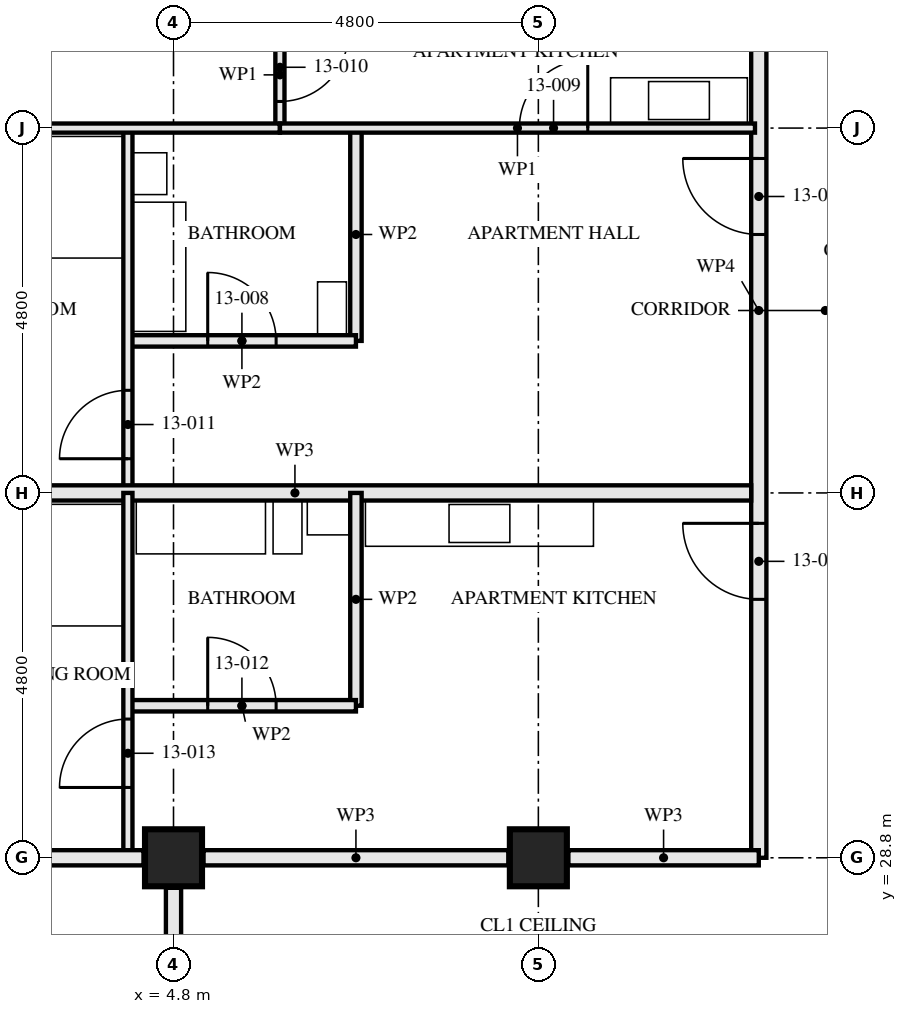
"""IFC4 building model, lengths in metres.
Left out: names, types, materials, properties, quantities, classifications, styles, units other than length and angle.
Written with IfcOpenShell. Run it as: python <this file> out.ifc"""

import sys

from ifc_helpers import new_model, si_unit, direction, frame, frame_2d, origin, origin_2d, place, context, subcontext, project, spatial, rectangle, hollow_rectangle, extrude, element, fill, save


model = new_model("IFC4")
c1 = context("Model", 3, precision=1e-05, world=origin(), true_north=direction((0.0, 1.0)))
c2 = subcontext(c1, "Body", "Model", "MODEL_VIEW")
j1 = project(units=[si_unit("LENGTHUNIT", "METRE"), si_unit("PLANEANGLEUNIT", "RADIAN")], contexts=[c1])
p1 = place(None, origin())
s1 = spatial("IfcSite", under=j1, at=p1, CompositionType="ELEMENT")
p2 = place(p1, origin())
s2 = spatial("IfcBuilding", under=s1, at=p2, CompositionType="ELEMENT")
p3 = place(p2, frame((0.0, 0.0, 51.5)))
s3 = spatial("IfcBuildingStorey", under=s2, at=p3, CompositionType="ELEMENT", Elevation=51.5)
for number, where, z_axis, x_axis in (
    (1, (4.8, 28.8, 0.0), (0.0, 0.0, 1.0), (0.0, 1.0, 0.0)),
    (2, (9.6, 28.8, 0.0), (0.0, 0.0, 1.0), (0.0, 1.0, 0.0)),
):
    element("IfcColumn", number, at=place(p3, frame(where, z_axis=z_axis, x_axis=x_axis)), inside=s3, PredefinedType="COLUMN", context=c2, shape_type="SweptSolid", body=[
        extrude(hollow_rectangle(XDim=0.75, YDim=0.75, WallThickness=0.08, at=origin_2d()), origin(), (0.0, 0.0, 1.0), 3.5),
    ])
p4 = place(p3, frame((4.8, 26.8, 0.0), z_axis=(0.0, 0.0, 1.0), x_axis=(0.0, 1.0, 0.0)))
e3 = element("IfcWall", 3, at=p4, inside=s3, PredefinedType="PARTITIONING", context=c2, shape_type="SweptSolid", body=[
    extrude(rectangle(XDim=1.605, YDim=0.2, at=frame_2d((0.802, 0.0))), origin(), (0.0, 0.0, 1.0), 3.33),
])
p5 = place(p3, frame((4.2, 35.6, 0.0), z_axis=(0.0, 0.0, 1.0), x_axis=(1.0, 0.0, 0.0)))
e4 = element("IfcWall", 4, at=p5, inside=s3, PredefinedType="PARTITIONING", context=c2, shape_type="SweptSolid", body=[
    extrude(rectangle(XDim=3.0, YDim=0.15, at=frame_2d((1.5, 0.0))), origin(), (0.0, 0.0, 1.0), 3.33),
])
p6 = place(p5, frame((1.05, 0.0, 0.0)))
e5 = element("IfcOpeningElement", 5, at=p6, cuts=e4, PredefinedType="OPENING", context=c2, shape_type="SweptSolid", body=[
    extrude(rectangle(XDim=0.9, YDim=2.1, at=frame_2d((0.45, 1.05))), frame((0.0, 0.085, 0.0), z_axis=(0.0, -1.0, 0.0), x_axis=(1.0, 0.0, 0.0)), (0.0, 0.0, 1.0), 0.171),
])
p7 = place(p3, frame((7.2, 38.4, 0.0), z_axis=(0.0, 0.0, 1.0), x_axis=(0.0, -1.0, 0.0)))
e6 = element("IfcWall", 6, at=p7, inside=s3, PredefinedType="PARTITIONING", context=c2, shape_type="SweptSolid", body=[
    extrude(rectangle(XDim=2.8, YDim=0.15, at=frame_2d((1.4, 0.0))), origin(), (0.0, 0.0, 1.0), 3.33),
])
p8 = place(p3, frame((6.2, 38.4, 0.0), z_axis=(0.0, 0.0, 1.0), x_axis=(1.0, 0.0, 0.0)))
e7 = element("IfcWall", 7, at=p8, inside=s3, PredefinedType="PARTITIONING", context=c2, shape_type="SweptSolid", body=[
    extrude(rectangle(XDim=6.25, YDim=0.12, at=frame_2d((3.125, 0.0))), origin(), (0.0, 0.0, 1.0), 2.55),
])
p9 = place(p8, frame((3.15, 0.0, 0.0)))
e8 = element("IfcOpeningElement", 8, at=p9, cuts=e7, PredefinedType="OPENING", context=c2, shape_type="SweptSolid", body=[
    extrude(rectangle(XDim=0.9, YDim=2.1, at=frame_2d((0.45, 1.05))), frame((0.0, 0.071, 0.0), z_axis=(0.0, -1.0, 0.0), x_axis=(1.0, 0.0, 0.0)), (0.0, 0.0, 1.0), 0.141),
])
p10 = place(p3, frame((6.2, 39.8, 0.0), z_axis=(0.0, 0.0, 1.0), x_axis=(0.0, -1.0, 0.0)))
e9 = element("IfcWall", 9, at=p10, inside=s3, PredefinedType="PARTITIONING", context=c2, shape_type="SweptSolid", body=[
    extrude(rectangle(XDim=1.4, YDim=0.12, at=frame_2d((0.7, 0.0))), origin(), (0.0, 0.0, 1.0), 3.33),
])
p11 = place(p10, frame((0.15, 0.0, 0.0)))
e10 = element("IfcOpeningElement", 10, at=p11, cuts=e9, PredefinedType="OPENING", context=c2, shape_type="SweptSolid", body=[
    extrude(rectangle(XDim=0.9, YDim=2.1, at=frame_2d((0.45, 1.05))), frame((0.0, 0.071, 0.0), z_axis=(0.0, -1.0, 0.0), x_axis=(1.0, 0.0, 0.0)), (0.0, 0.0, 1.0), 0.141),
])
p12 = place(p3, frame((4.2, 38.4, 0.0), z_axis=(0.0, 0.0, 1.0), x_axis=(0.0, -1.0, 0.0)))
e11 = element("IfcWall", 11, at=p12, inside=s3, PredefinedType="PARTITIONING", context=c2, shape_type="SweptSolid", body=[
    extrude(rectangle(XDim=4.8, YDim=0.12, at=frame_2d((2.4, 0.0))), origin(), (0.0, 0.0, 1.0), 3.33),
])
p13 = place(p12, frame((3.45, 0.0, 0.0)))
e12 = element("IfcOpeningElement", 12, at=p13, cuts=e11, PredefinedType="OPENING", context=c2, shape_type="SweptSolid", body=[
    extrude(rectangle(XDim=0.9, YDim=2.1, at=frame_2d((0.45, 1.05))), frame((0.0, 0.071, 0.0), z_axis=(0.0, -1.0, 0.0), x_axis=(1.0, 0.0, 0.0)), (0.0, 0.0, 1.0), 0.141),
])
p14 = place(p3, frame((0.395, 38.4, 0.0), z_axis=(0.0, 0.0, 1.0), x_axis=(1.0, 0.0, 0.0)))
e13 = element("IfcWall", 13, at=p14, inside=s3, PredefinedType="PARTITIONING", context=c2, shape_type="SweptSolid", body=[
    extrude(rectangle(XDim=5.805, YDim=0.12, at=frame_2d((2.902, 0.0))), origin(), (0.0, 0.0, 1.0), 2.55),
])
p15 = place(p3, frame((0.395, 33.6, 0.0), z_axis=(0.0, 0.0, 1.0), x_axis=(1.0, 0.0, 0.0)))
e14 = element("IfcWall", 14, at=p15, inside=s3, PredefinedType="PARTITIONING", context=c2, shape_type="SweptSolid", body=[
    extrude(rectangle(XDim=12.005, YDim=0.2, at=frame_2d((6.002, 0.0))), origin(), (0.0, 0.0, 1.0), 2.55),
])
p16 = place(p3, frame((4.2, 30.8, 0.0), z_axis=(0.0, 0.0, 1.0), x_axis=(1.0, 0.0, 0.0)))
e15 = element("IfcWall", 15, at=p16, inside=s3, PredefinedType="PARTITIONING", context=c2, shape_type="SweptSolid", body=[
    extrude(rectangle(XDim=3.0, YDim=0.15, at=frame_2d((1.5, 0.0))), origin(), (0.0, 0.0, 1.0), 3.33),
])
p17 = place(p16, frame((1.05, 0.0, 0.0)))
e16 = element("IfcOpeningElement", 16, at=p17, cuts=e15, PredefinedType="OPENING", context=c2, shape_type="SweptSolid", body=[
    extrude(rectangle(XDim=0.9, YDim=2.1, at=frame_2d((0.45, 1.05))), frame((0.0, 0.085, 0.0), z_axis=(0.0, -1.0, 0.0), x_axis=(1.0, 0.0, 0.0)), (0.0, 0.0, 1.0), 0.171),
])
p18 = place(p3, frame((7.2, 33.6, 0.0), z_axis=(0.0, 0.0, 1.0), x_axis=(0.0, -1.0, 0.0)))
e17 = element("IfcWall", 17, at=p18, inside=s3, PredefinedType="PARTITIONING", context=c2, shape_type="SweptSolid", body=[
    extrude(rectangle(XDim=2.8, YDim=0.15, at=frame_2d((1.4, 0.0))), origin(), (0.0, 0.0, 1.0), 3.33),
])
p19 = place(p3, frame((4.2, 33.6, 0.0), z_axis=(0.0, 0.0, 1.0), x_axis=(0.0, -1.0, 0.0)))
e18 = element("IfcWall", 18, at=p19, inside=s3, PredefinedType="PARTITIONING", context=c2, shape_type="SweptSolid", body=[
    extrude(rectangle(XDim=4.8, YDim=0.12, at=frame_2d((2.4, 0.0))), origin(), (0.0, 0.0, 1.0), 3.33),
])
p20 = place(p19, frame((2.975, 0.0, 0.0)))
e19 = element("IfcOpeningElement", 19, at=p20, cuts=e18, PredefinedType="OPENING", context=c2, shape_type="SweptSolid", body=[
    extrude(rectangle(XDim=0.9, YDim=2.1, at=frame_2d((0.45, 1.05))), frame((0.0, 0.071, 0.0), z_axis=(0.0, -1.0, 0.0), x_axis=(1.0, 0.0, 0.0)), (0.0, 0.0, 1.0), 0.141),
])
p21 = place(p3, frame((12.5, 43.2, 0.0), z_axis=(0.0, 0.0, 1.0), x_axis=(0.0, -1.0, 0.0)))
e20 = element("IfcWall", 20, at=p21, inside=s3, PredefinedType="PARTITIONING", context=c2, shape_type="SweptSolid", body=[
    extrude(rectangle(XDim=14.4, YDim=0.2, at=frame_2d((7.2, 0.0))), origin(), (0.0, 0.0, 1.0), 2.55),
])
p22 = place(p21, frame((1.4, 0.0, 0.0)))
e21 = element("IfcOpeningElement", 21, at=p22, cuts=e20, PredefinedType="OPENING", context=c2, shape_type="SweptSolid", body=[
    extrude(rectangle(XDim=1.0, YDim=2.1, at=frame_2d((0.5, 1.05))), frame((0.0, 0.111, 0.0), z_axis=(0.0, -1.0, 0.0), x_axis=(1.0, 0.0, 0.0)), (0.0, 0.0, 1.0), 0.221),
])
p23 = place(p21, frame((5.2, 0.0, 0.0)))
e22 = element("IfcOpeningElement", 22, at=p23, cuts=e20, PredefinedType="OPENING", context=c2, shape_type="SweptSolid", body=[
    extrude(rectangle(XDim=1.0, YDim=2.1, at=frame_2d((0.5, 1.05))), frame((0.0, 0.111, 0.0), z_axis=(0.0, -1.0, 0.0), x_axis=(1.0, 0.0, 0.0)), (0.0, 0.0, 1.0), 0.221),
])
p24 = place(p21, frame((10.0, 0.0, 0.0)))
e23 = element("IfcOpeningElement", 23, at=p24, cuts=e20, PredefinedType="OPENING", context=c2, shape_type="SweptSolid", body=[
    extrude(rectangle(XDim=1.0, YDim=2.1, at=frame_2d((0.5, 1.05))), frame((0.0, 0.111, 0.0), z_axis=(0.0, -1.0, 0.0), x_axis=(1.0, 0.0, 0.0)), (0.0, 0.0, 1.0), 0.221),
])
p25 = place(p3, frame((12.5, 28.8, 0.0), z_axis=(0.0, 0.0, 1.0), x_axis=(-1.0, 0.0, 0.0)))
e24 = element("IfcWall", 24, at=p25, inside=s3, PredefinedType="PARTITIONING", context=c2, shape_type="SweptSolid", body=[
    extrude(rectangle(XDim=2.505, YDim=0.2, at=frame_2d((1.252, 0.0))), origin(), (0.0, 0.0, 1.0), 2.32),
])
p26 = place(p3, frame((9.205, 28.8, 0.0), z_axis=(0.0, 0.0, 1.0), x_axis=(-1.0, 0.0, 0.0)))
e25 = element("IfcWall", 25, at=p26, inside=s3, PredefinedType="PARTITIONING", context=c2, shape_type="SweptSolid", body=[
    extrude(rectangle(XDim=4.01, YDim=0.2, at=frame_2d((2.005, 0.0))), origin(), (0.0, 0.0, 1.0), 2.32),
])
p27 = place(p3, frame((4.405, 28.8, 0.0), z_axis=(0.0, 0.0, 1.0), x_axis=(-1.0, 0.0, 0.0)))
e26 = element("IfcWall", 26, at=p27, inside=s3, PredefinedType="PARTITIONING", context=c2, shape_type="SweptSolid", body=[
    extrude(rectangle(XDim=4.101, YDim=0.2, at=frame_2d((2.05, 0.0))), origin(), (0.0, 0.0, 1.0), 2.32),
])
p28 = place(p6, origin())
e27 = element("IfcDoor", 27, at=p28, inside=s3, OperationType="SINGLE_SWING_RIGHT", PredefinedType="DOOR", context=c2, shape_type="SweptSolid", body=[
    extrude(rectangle(XDim=0.9, YDim=2.1, at=frame_2d((0.45, 1.05))), frame((0.0, 0.022, 0.0), z_axis=(0.0, -1.0, 0.0), x_axis=(1.0, 0.0, 0.0)), (0.0, 0.0, 1.0), 0.044),
])
fill(e5, e27)
p29 = place(p9, origin())
e28 = element("IfcDoor", 28, at=p29, inside=s3, OperationType="SINGLE_SWING_LEFT", PredefinedType="DOOR", context=c2, shape_type="SweptSolid", body=[
    extrude(rectangle(XDim=0.9, YDim=2.1, at=frame_2d((0.45, 1.05))), frame((0.0, 0.022, 0.0), z_axis=(0.0, -1.0, 0.0), x_axis=(1.0, 0.0, 0.0)), (0.0, 0.0, 1.0), 0.044),
])
fill(e8, e28)
p30 = place(p11, origin())
e29 = element("IfcDoor", 29, at=p30, inside=s3, OperationType="SINGLE_SWING_RIGHT", PredefinedType="DOOR", context=c2, shape_type="SweptSolid", body=[
    extrude(rectangle(XDim=0.9, YDim=2.1, at=frame_2d((0.45, 1.05))), frame((0.0, 0.022, 0.0), z_axis=(0.0, -1.0, 0.0), x_axis=(1.0, 0.0, 0.0)), (0.0, 0.0, 1.0), 0.044),
])
fill(e10, e29)
p31 = place(p13, frame((0.9, 0.0, 0.0), z_axis=(0.0, 0.0, 1.0), x_axis=(-1.0, 0.0, 0.0)))
e30 = element("IfcDoor", 30, at=p31, inside=s3, OperationType="SINGLE_SWING_RIGHT", PredefinedType="DOOR", context=c2, shape_type="SweptSolid", body=[
    extrude(rectangle(XDim=0.9, YDim=2.1, at=frame_2d((0.45, 1.05))), frame((0.0, 0.022, 0.0), z_axis=(0.0, -1.0, 0.0), x_axis=(1.0, 0.0, 0.0)), (0.0, 0.0, 1.0), 0.044),
])
fill(e12, e30)
p32 = place(p17, origin())
e31 = element("IfcDoor", 31, at=p32, inside=s3, OperationType="SINGLE_SWING_RIGHT", PredefinedType="DOOR", context=c2, shape_type="SweptSolid", body=[
    extrude(rectangle(XDim=0.9, YDim=2.1, at=frame_2d((0.45, 1.05))), frame((0.0, 0.022, 0.0), z_axis=(0.0, -1.0, 0.0), x_axis=(1.0, 0.0, 0.0)), (0.0, 0.0, 1.0), 0.044),
])
fill(e16, e31)
p33 = place(p20, frame((0.9, 0.0, 0.0), z_axis=(0.0, 0.0, 1.0), x_axis=(-1.0, 0.0, 0.0)))
e32 = element("IfcDoor", 32, at=p33, inside=s3, OperationType="SINGLE_SWING_RIGHT", PredefinedType="DOOR", context=c2, shape_type="SweptSolid", body=[
    extrude(rectangle(XDim=0.9, YDim=2.1, at=frame_2d((0.45, 1.05))), frame((0.0, 0.022, 0.0), z_axis=(0.0, -1.0, 0.0), x_axis=(1.0, 0.0, 0.0)), (0.0, 0.0, 1.0), 0.044),
])
fill(e19, e32)
p34 = place(p23, frame((1.0, 0.0, 0.0), z_axis=(0.0, 0.0, 1.0), x_axis=(-1.0, 0.0, 0.0)))
e33 = element("IfcDoor", 33, at=p34, inside=s3, OperationType="SINGLE_SWING_LEFT", PredefinedType="DOOR", context=c2, shape_type="SweptSolid", body=[
    extrude(rectangle(XDim=1.0, YDim=2.1, at=frame_2d((0.5, 1.05))), frame((0.0, 0.027, 0.0), z_axis=(0.0, -1.0, 0.0), x_axis=(1.0, 0.0, 0.0)), (0.0, 0.0, 1.0), 0.054),
])
fill(e22, e33)
p35 = place(p24, frame((1.0, 0.0, 0.0), z_axis=(0.0, 0.0, 1.0), x_axis=(-1.0, 0.0, 0.0)))
e34 = element("IfcDoor", 34, at=p35, inside=s3, OperationType="SINGLE_SWING_LEFT", PredefinedType="DOOR", context=c2, shape_type="SweptSolid", body=[
    extrude(rectangle(XDim=1.0, YDim=2.1, at=frame_2d((0.5, 1.05))), frame((0.0, 0.027, 0.0), z_axis=(0.0, -1.0, 0.0), x_axis=(1.0, 0.0, 0.0)), (0.0, 0.0, 1.0), 0.054),
])
fill(e23, e34)
save(model, sys.argv[1])
